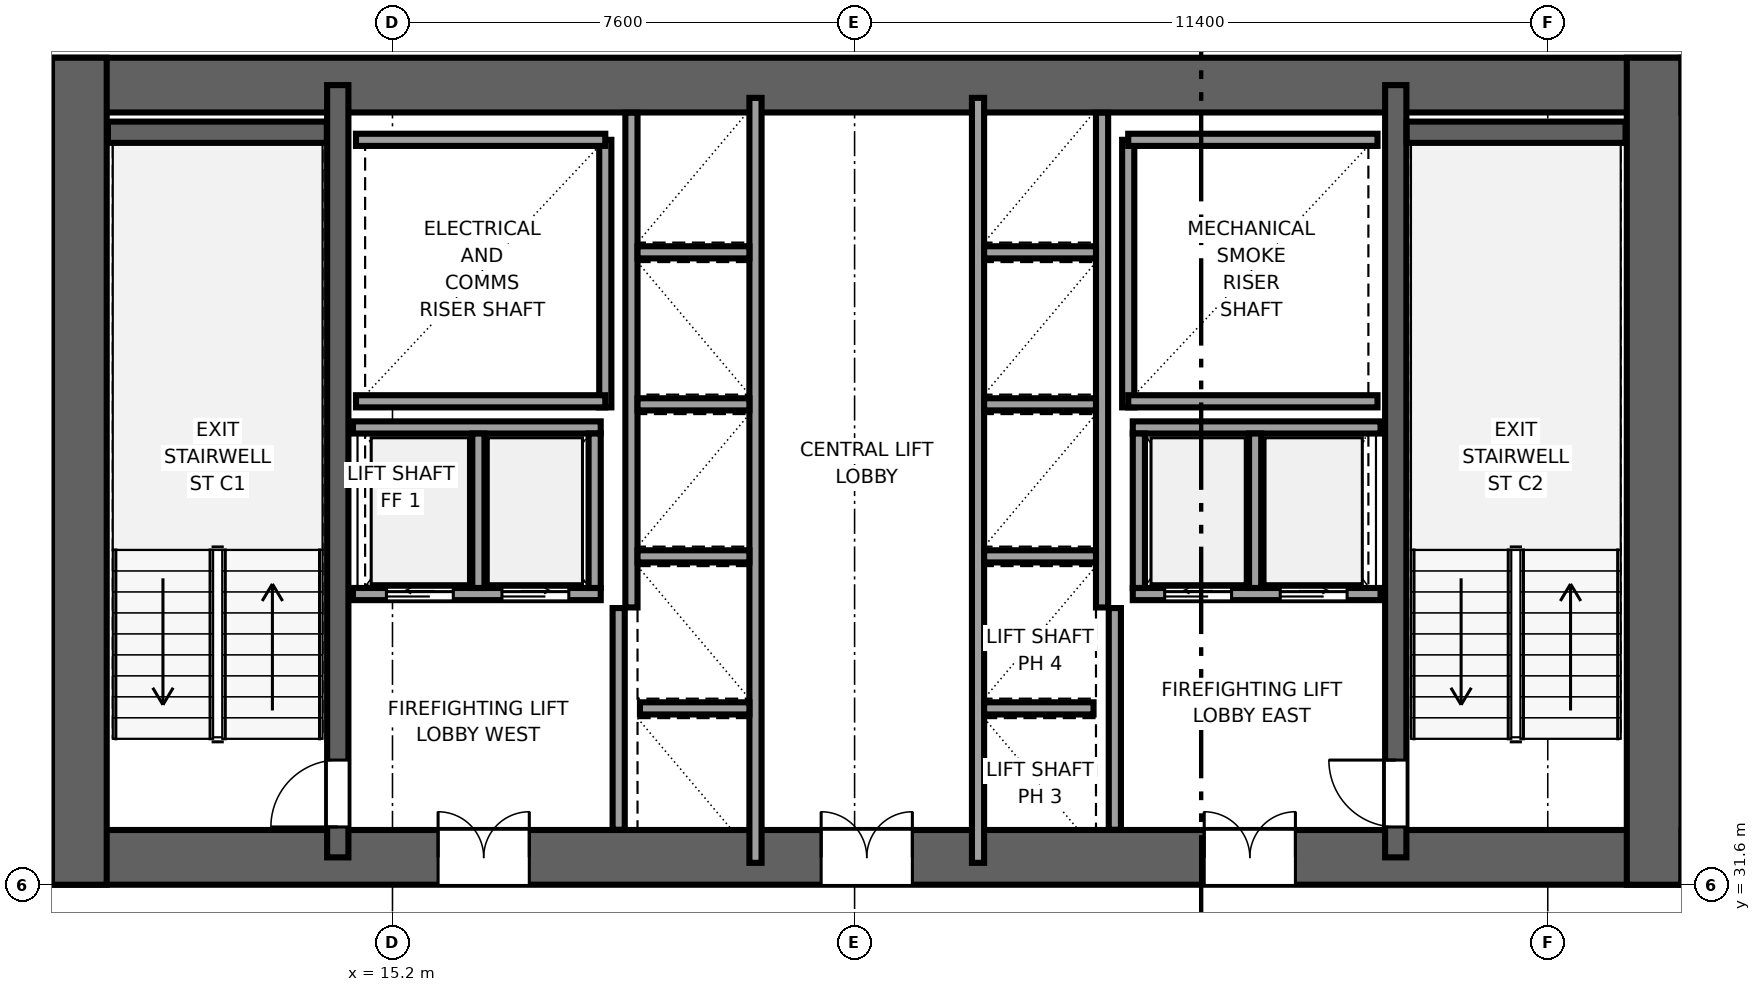
"""IFC4 building model, lengths in metres.
Left out: names, types, materials, properties, quantities, classifications, styles, units other than length and angle.
Written with IfcOpenShell. Run it as: python <this file> out.ifc"""

import sys

from ifc_helpers import new_model, si_unit, direction, frame, frame_2d, origin, place, context, subcontext, project, spatial, rectangle, extrude, source, transform, mapped, element, fill, save


model = new_model("IFC4")
c1 = context("Model", 3, precision=1e-05, world=origin(), true_north=direction((0.0, 1.0)))
c2 = subcontext(c1, "Body", "Model", "MODEL_VIEW")
j1 = project(units=[si_unit("LENGTHUNIT", "METRE"), si_unit("PLANEANGLEUNIT", "RADIAN")], contexts=[c1])
p1 = place(None, origin())
s1 = spatial("IfcSite", under=j1, at=p1, CompositionType="ELEMENT")
p2 = place(p1, origin())
s2 = spatial("IfcBuilding", under=s1, at=p2, CompositionType="ELEMENT")
p3 = place(p2, frame((0.0, 0.0, 32.0)))
s3 = spatial("IfcBuildingStorey", under=s2, at=p3, CompositionType="ELEMENT", Elevation=32.0)
p4 = place(p3, frame((9.6, 32.05, 0.0), z_axis=(0.0, 0.0, 1.0), x_axis=(1.0, 0.0, 0.0)))
e1 = element("IfcWall", 1, at=p4, inside=s3, PredefinedType="SHEAR", context=c2, shape_type="SweptSolid", body=[
    extrude(rectangle(XDim=26.8, YDim=0.9, at=frame_2d((13.4, 0.0))), origin(), (0.0, 0.0, 1.0), 3.55),
])
p5 = place(p4, frame((7.85, 0.0, 0.0), z_axis=(0.0, 0.0, 1.0), x_axis=(-1.0, 0.0, 0.0)))
e2 = element("IfcOpeningElement", 2, at=p5, cuts=e1, PredefinedType="OPENING", context=c2, shape_type="SweptSolid", body=[
    extrude(rectangle(XDim=1.5, YDim=2.04, at=frame_2d((0.75, 1.02))), frame((0.0, 0.46, 0.0), z_axis=(0.0, -1.0, 0.0), x_axis=(1.0, 0.0, 0.0)), (0.0, 0.0, 1.0), 0.92),
])
p6 = place(p4, frame((14.15, 0.0, 0.0), z_axis=(0.0, 0.0, 1.0), x_axis=(-1.0, 0.0, 0.0)))
e3 = element("IfcOpeningElement", 3, at=p6, cuts=e1, PredefinedType="OPENING", context=c2, shape_type="SweptSolid", body=[
    extrude(rectangle(XDim=1.5, YDim=2.04, at=frame_2d((0.75, 1.02))), frame((0.0, 0.46, 0.0), z_axis=(0.0, -1.0, 0.0), x_axis=(1.0, 0.0, 0.0)), (0.0, 0.0, 1.0), 0.92),
])
p7 = place(p4, frame((20.45, 0.0, 0.0), z_axis=(0.0, 0.0, 1.0), x_axis=(-1.0, 0.0, 0.0)))
e4 = element("IfcOpeningElement", 4, at=p7, cuts=e1, PredefinedType="OPENING", context=c2, shape_type="SweptSolid", body=[
    extrude(rectangle(XDim=1.5, YDim=2.04, at=frame_2d((0.75, 1.02))), frame((0.0, 0.46, 0.0), z_axis=(0.0, -1.0, 0.0), x_axis=(1.0, 0.0, 0.0)), (0.0, 0.0, 1.0), 0.92),
])
p8 = place(p3, frame((9.6, 44.75, 0.0), z_axis=(0.0, 0.0, 1.0), x_axis=(1.0, 0.0, 0.0)))
e5 = element("IfcWall", 5, at=p8, inside=s3, PredefinedType="SHEAR", context=c2, shape_type="SweptSolid", body=[
    extrude(rectangle(XDim=26.8, YDim=0.9, at=frame_2d((13.4, 0.0))), origin(), (0.0, 0.0, 1.0), 3.55),
])
for number, where, z_axis, x_axis in (
    (6, (10.05, 31.6, 0.0), (0.0, 0.0, 1.0), (0.0, 1.0, 0.0)),
    (7, (35.95, 31.6, 0.0), (0.0, 0.0, 1.0), (0.0, 1.0, 0.0)),
):
    element("IfcWall", number, at=place(p3, frame(where, z_axis=z_axis, x_axis=x_axis)), inside=s3, PredefinedType="SHEAR", context=c2, shape_type="SweptSolid", body=[
        extrude(rectangle(XDim=13.6, YDim=0.9, at=frame_2d((6.8, 0.0))), origin(), (0.0, 0.0, 1.0), 3.55),
    ])
p9 = place(p3, frame((14.3, 32.05, 0.0), z_axis=(0.0, 0.0, 1.0), x_axis=(0.0, 1.0, 0.0)))
e8 = element("IfcWall", 8, at=p9, inside=s3, PredefinedType="SHEAR", context=c2, shape_type="SweptSolid", body=[
    extrude(rectangle(XDim=12.7, YDim=0.35, at=frame_2d((6.35, 0.0))), origin(), (0.0, 0.0, 1.0), 3.55),
])
p10 = place(p9, frame((0.5, 0.0, 0.0)))
e9 = element("IfcOpeningElement", 9, at=p10, cuts=e8, PredefinedType="OPENING", context=c2, shape_type="SweptSolid", body=[
    extrude(rectangle(XDim=1.1, YDim=2.12, at=frame_2d((0.55, 1.06))), frame((0.0, 0.185, 0.0), z_axis=(0.0, -1.0, 0.0), x_axis=(1.0, 0.0, 0.0)), (0.0, 0.0, 1.0), 0.37),
])
p11 = place(p3, frame((31.7, 32.05, 0.0), z_axis=(0.0, 0.0, 1.0), x_axis=(0.0, 1.0, 0.0)))
e10 = element("IfcWall", 10, at=p11, inside=s3, PredefinedType="SHEAR", context=c2, shape_type="SweptSolid", body=[
    extrude(rectangle(XDim=12.7, YDim=0.35, at=frame_2d((6.35, 0.0))), origin(), (0.0, 0.0, 1.0), 3.55),
])
p12 = place(p11, frame((1.6, 0.0, 0.0), z_axis=(0.0, 0.0, 1.0), x_axis=(-1.0, 0.0, 0.0)))
e11 = element("IfcOpeningElement", 11, at=p12, cuts=e10, PredefinedType="OPENING", context=c2, shape_type="SweptSolid", body=[
    extrude(rectangle(XDim=1.1, YDim=2.12, at=frame_2d((0.55, 1.06))), frame((0.0, 0.185, 0.0), z_axis=(0.0, -1.0, 0.0), x_axis=(1.0, 0.0, 0.0)), (0.0, 0.0, 1.0), 0.37),
])
for number, where, z_axis, x_axis in (
    (12, (10.52, 43.975, 0.0), (0.0, 0.0, 1.0), (1.0, 0.0, 0.0)),
    (13, (31.88, 43.975, 0.0), (0.0, 0.0, 1.0), (1.0, 0.0, 0.0)),
):
    element("IfcWall", number, at=place(p3, frame(where, z_axis=z_axis, x_axis=x_axis)), inside=s3, PredefinedType="SHEAR", context=c2, shape_type="SweptSolid", body=[
        extrude(rectangle(XDim=3.6, YDim=0.35, at=frame_2d((1.8, 0.0))), origin(), (0.0, 0.0, 1.0), 3.55),
    ])
p13 = place(p3, frame((18.7, 39.45, 0.0), z_axis=(0.0, 0.0, 1.0), x_axis=(0.0, 1.0, 0.0)))
e14 = element("IfcWall", 14, at=p13, inside=s3, PredefinedType="SOLIDWALL", context=c2, shape_type="SweptSolid", body=[
    extrude(rectangle(XDim=4.4, YDim=0.2, at=frame_2d((2.2, 0.0))), origin(), (0.0, 0.0, 1.0), 3.37),
])
for number, where, z_axis, x_axis in (
    (15, (14.6, 39.55, 0.0), (0.0, 0.0, 1.0), (1.0, 0.0, 0.0)),
    (16, (14.6, 43.85, 0.0), (0.0, 0.0, 1.0), (1.0, 0.0, 0.0)),
):
    element("IfcWall", number, at=place(p3, frame(where, z_axis=z_axis, x_axis=x_axis)), inside=s3, PredefinedType="SOLIDWALL", context=c2, shape_type="SweptSolid", body=[
        extrude(rectangle(XDim=4.1, YDim=0.2, at=frame_2d((2.05, 0.0))), origin(), (0.0, 0.0, 1.0), 3.37),
    ])
p14 = place(p3, frame((27.3, 39.45, 0.0), z_axis=(0.0, 0.0, 1.0), x_axis=(0.0, 1.0, 0.0)))
e17 = element("IfcWall", 17, at=p14, inside=s3, PredefinedType="SOLIDWALL", context=c2, shape_type="SweptSolid", body=[
    extrude(rectangle(XDim=4.4, YDim=0.2, at=frame_2d((2.2, 0.0))), origin(), (0.0, 0.0, 1.0), 3.37),
])
for number, where, z_axis, x_axis in (
    (18, (27.3, 39.55, 0.0), (0.0, 0.0, 1.0), (1.0, 0.0, 0.0)),
    (19, (27.3, 43.85, 0.0), (0.0, 0.0, 1.0), (1.0, 0.0, 0.0)),
):
    element("IfcWall", number, at=place(p3, frame(where, z_axis=z_axis, x_axis=x_axis)), inside=s3, PredefinedType="SOLIDWALL", context=c2, shape_type="SweptSolid", body=[
        extrude(rectangle(XDim=4.1, YDim=0.2, at=frame_2d((2.05, 0.0))), origin(), (0.0, 0.0, 1.0), 3.37),
    ])
for number, where, z_axis, x_axis in (
    (20, (18.92, 32.504, 0.0), (0.0, 0.0, 1.0), (0.0, 1.0, 0.0)),
    (21, (27.08, 32.504, 0.0), (0.0, 0.0, 1.0), (0.0, 1.0, 0.0)),
):
    element("IfcWall", number, at=place(p3, frame(where, z_axis=z_axis, x_axis=x_axis)), inside=s3, PredefinedType="SOLIDWALL", context=c2, shape_type="SweptSolid", body=[
        extrude(rectangle(XDim=3.646, YDim=0.2, at=frame_2d((1.823, 0.0))), origin(), (0.0, 0.0, 1.0), 3.37),
    ])
p15 = place(p3, frame((21.17, 31.96, 0.0), z_axis=(0.0, 0.0, 1.0), x_axis=(0.0, 1.0, 0.0)))
e22 = element("IfcWall", 22, at=p15, inside=s3, PredefinedType="SOLIDWALL", context=c2, shape_type="SweptSolid", body=[
    extrude(rectangle(XDim=12.58, YDim=0.2, at=frame_2d((6.29, 0.0))), origin(), (0.0, 0.0, 1.0), 3.37),
])
p16 = place(p3, frame((19.13, 36.16, 0.0), z_axis=(0.0, 0.0, 1.0), x_axis=(0.0, 1.0, 0.0)))
e23 = element("IfcWall", 23, at=p16, inside=s3, PredefinedType="SOLIDWALL", context=c2, shape_type="SweptSolid", body=[
    extrude(rectangle(XDim=8.136, YDim=0.2, at=frame_2d((4.068, 0.0))), origin(), (0.0, 0.0, 1.0), 3.37),
])
p17 = place(p3, frame((19.27, 34.5, 0.0), z_axis=(0.0, 0.0, 1.0), x_axis=(1.0, 0.0, 0.0)))
e24 = element("IfcWall", 24, at=p17, inside=s3, PredefinedType="SOLIDWALL", context=c2, shape_type="SweptSolid", body=[
    extrude(rectangle(XDim=1.8, YDim=0.2, at=frame_2d((0.9, 0.0))), origin(), (0.0, 0.0, 1.0), 3.37),
])
for number, where, z_axis, x_axis in (
    (25, (19.23, 37.0, 0.0), (0.0, 0.0, 1.0), (1.0, 0.0, 0.0)),
    (26, (19.23, 39.5, 0.0), (0.0, 0.0, 1.0), (1.0, 0.0, 0.0)),
    (27, (19.23, 42.0, 0.0), (0.0, 0.0, 1.0), (1.0, 0.0, 0.0)),
):
    element("IfcWall", number, at=place(p3, frame(where, z_axis=z_axis, x_axis=x_axis)), inside=s3, PredefinedType="SOLIDWALL", context=c2, shape_type="SweptSolid", body=[
        extrude(rectangle(XDim=1.84, YDim=0.2, at=frame_2d((0.92, 0.0))), origin(), (0.0, 0.0, 1.0), 3.37),
    ])
p18 = place(p3, frame((27.375, 36.38, 0.0), z_axis=(0.0, 0.0, 1.0), x_axis=(1.0, 0.0, 0.0)))
e28 = element("IfcWall", 28, at=p18, inside=s3, PredefinedType="SOLIDWALL", context=c2, shape_type="SweptSolid", body=[
    extrude(rectangle(XDim=4.075, YDim=0.2, at=frame_2d((2.038, 0.0))), origin(), (0.0, 0.0, 1.0), 3.37),
])
p19 = place(p18, frame((0.525, 0.0, 0.0)))
e29 = element("IfcOpeningElement", 29, at=p19, cuts=e28, PredefinedType="OPENING", context=c2, shape_type="SweptSolid", body=[
    extrude(rectangle(XDim=1.1, YDim=2.12, at=frame_2d((0.55, 1.06))), frame((0.0, 0.11, 0.0), z_axis=(0.0, -1.0, 0.0), x_axis=(1.0, 0.0, 0.0)), (0.0, 0.0, 1.0), 0.22),
])
p20 = place(p18, frame((2.425, 0.0, 0.0)))
e30 = element("IfcOpeningElement", 30, at=p20, cuts=e28, PredefinedType="OPENING", context=c2, shape_type="SweptSolid", body=[
    extrude(rectangle(XDim=1.1, YDim=2.12, at=frame_2d((0.55, 1.06))), frame((0.0, 0.11, 0.0), z_axis=(0.0, -1.0, 0.0), x_axis=(1.0, 0.0, 0.0)), (0.0, 0.0, 1.0), 0.22),
])
p21 = place(p3, frame((27.375, 39.12, 0.0), z_axis=(0.0, 0.0, 1.0), x_axis=(1.0, 0.0, 0.0)))
e31 = element("IfcWall", 31, at=p21, inside=s3, PredefinedType="SOLIDWALL", context=c2, shape_type="SweptSolid", body=[
    extrude(rectangle(XDim=4.075, YDim=0.2, at=frame_2d((2.038, 0.0))), origin(), (0.0, 0.0, 1.0), 3.37),
])
for number, where, z_axis, x_axis in (
    (32, (27.475, 36.48, 0.0), (0.0, 0.0, 1.0), (0.0, 1.0, 0.0)),
    (33, (29.387, 36.48, 0.0), (0.0, 0.0, 1.0), (0.0, 1.0, 0.0)),
):
    element("IfcWall", number, at=place(p3, frame(where, z_axis=z_axis, x_axis=x_axis)), inside=s3, PredefinedType="SOLIDWALL", context=c2, shape_type="SweptSolid", body=[
        extrude(rectangle(XDim=2.54, YDim=0.2, at=frame_2d((1.27, 0.0))), origin(), (0.0, 0.0, 1.0), 3.37),
    ])
p22 = place(p3, frame((14.55, 36.38, 0.0), z_axis=(0.0, 0.0, 1.0), x_axis=(1.0, 0.0, 0.0)))
e34 = element("IfcWall", 34, at=p22, inside=s3, PredefinedType="SOLIDWALL", context=c2, shape_type="SweptSolid", body=[
    extrude(rectangle(XDim=4.075, YDim=0.2, at=frame_2d((2.038, 0.0))), origin(), (0.0, 0.0, 1.0), 3.37),
])
p23 = place(p22, frame((0.55, 0.0, 0.0)))
e35 = element("IfcOpeningElement", 35, at=p23, cuts=e34, PredefinedType="OPENING", context=c2, shape_type="SweptSolid", body=[
    extrude(rectangle(XDim=1.1, YDim=2.12, at=frame_2d((0.55, 1.06))), frame((0.0, 0.11, 0.0), z_axis=(0.0, -1.0, 0.0), x_axis=(1.0, 0.0, 0.0)), (0.0, 0.0, 1.0), 0.22),
])
p24 = place(p22, frame((2.45, 0.0, 0.0)))
e36 = element("IfcOpeningElement", 36, at=p24, cuts=e34, PredefinedType="OPENING", context=c2, shape_type="SweptSolid", body=[
    extrude(rectangle(XDim=1.1, YDim=2.12, at=frame_2d((0.55, 1.06))), frame((0.0, 0.11, 0.0), z_axis=(0.0, -1.0, 0.0), x_axis=(1.0, 0.0, 0.0)), (0.0, 0.0, 1.0), 0.22),
])
p25 = place(p3, frame((14.55, 39.12, 0.0), z_axis=(0.0, 0.0, 1.0), x_axis=(1.0, 0.0, 0.0)))
e37 = element("IfcWall", 37, at=p25, inside=s3, PredefinedType="SOLIDWALL", context=c2, shape_type="SweptSolid", body=[
    extrude(rectangle(XDim=4.075, YDim=0.2, at=frame_2d((2.038, 0.0))), origin(), (0.0, 0.0, 1.0), 3.37),
])
for number, where, z_axis, x_axis in (
    (38, (18.525, 36.48, 0.0), (0.0, 0.0, 1.0), (0.0, 1.0, 0.0)),
    (39, (16.613, 36.48, 0.0), (0.0, 0.0, 1.0), (0.0, 1.0, 0.0)),
):
    element("IfcWall", number, at=place(p3, frame(where, z_axis=z_axis, x_axis=x_axis)), inside=s3, PredefinedType="SOLIDWALL", context=c2, shape_type="SweptSolid", body=[
        extrude(rectangle(XDim=2.54, YDim=0.2, at=frame_2d((1.27, 0.0))), origin(), (0.0, 0.0, 1.0), 3.37),
    ])
p26 = place(p3, frame((24.83, 31.96, 0.0), z_axis=(0.0, 0.0, 1.0), x_axis=(0.0, 1.0, 0.0)))
e40 = element("IfcWall", 40, at=p26, inside=s3, PredefinedType="SOLIDWALL", context=c2, shape_type="SweptSolid", body=[
    extrude(rectangle(XDim=12.58, YDim=0.2, at=frame_2d((6.29, 0.0))), origin(), (0.0, 0.0, 1.0), 3.37),
])
p27 = place(p3, frame((26.87, 36.16, 0.0), z_axis=(0.0, 0.0, 1.0), x_axis=(0.0, 1.0, 0.0)))
e41 = element("IfcWall", 41, at=p27, inside=s3, PredefinedType="SOLIDWALL", context=c2, shape_type="SweptSolid", body=[
    extrude(rectangle(XDim=8.136, YDim=0.2, at=frame_2d((4.068, 0.0))), origin(), (0.0, 0.0, 1.0), 3.37),
])
p28 = place(p3, frame((24.93, 34.5, 0.0), z_axis=(0.0, 0.0, 1.0), x_axis=(1.0, 0.0, 0.0)))
e42 = element("IfcWall", 42, at=p28, inside=s3, PredefinedType="SOLIDWALL", context=c2, shape_type="SweptSolid", body=[
    extrude(rectangle(XDim=1.8, YDim=0.2, at=frame_2d((0.9, 0.0))), origin(), (0.0, 0.0, 1.0), 3.37),
])
for number, where, z_axis, x_axis in (
    (43, (24.93, 37.0, 0.0), (0.0, 0.0, 1.0), (1.0, 0.0, 0.0)),
    (44, (24.93, 39.5, 0.0), (0.0, 0.0, 1.0), (1.0, 0.0, 0.0)),
    (45, (24.93, 42.0, 0.0), (0.0, 0.0, 1.0), (1.0, 0.0, 0.0)),
):
    element("IfcWall", number, at=place(p3, frame(where, z_axis=z_axis, x_axis=x_axis)), inside=s3, PredefinedType="SOLIDWALL", context=c2, shape_type="SweptSolid", body=[
        extrude(rectangle(XDim=1.84, YDim=0.2, at=frame_2d((0.92, 0.0))), origin(), (0.0, 0.0, 1.0), 3.37),
    ])
m1 = source(origin(), c2, "Body", "SweptSolid", [
    extrude(rectangle(XDim=1.1, YDim=2.12, at=frame_2d((0.55, 1.06))), frame((0.0, 0.025, 0.0), z_axis=(0.0, -1.0, 0.0), x_axis=(1.0, 0.0, 0.0)), (0.0, 0.0, 1.0), 0.05),
])
p29 = place(p10, origin())
e46 = element("IfcDoor", 46, at=p29, inside=s3, OperationType="SINGLE_SWING_LEFT", PredefinedType="DOOR", context=c2, shape_type="MappedRepresentation", body=[
    mapped(m1, transform((0.0, 0.0, 0.0), x_axis=(1.0, 0.0, 0.0), y_axis=(0.0, 1.0, 0.0), z_axis=(0.0, 0.0, 1.0), scale=1.0)),
])
fill(e9, e46)
p30 = place(p12, origin())
e47 = element("IfcDoor", 47, at=p30, inside=s3, OperationType="SINGLE_SWING_RIGHT", PredefinedType="DOOR", context=c2, shape_type="MappedRepresentation", body=[
    mapped(m1, transform((0.0, 0.0, 0.0), x_axis=(1.0, 0.0, 0.0), y_axis=(0.0, 1.0, 0.0), z_axis=(0.0, 0.0, 1.0), scale=1.0)),
])
fill(e11, e47)
m2 = source(origin(), c2, "Body", "SweptSolid", [
    extrude(rectangle(XDim=1.5, YDim=2.04, at=frame_2d((0.75, 1.02))), frame((0.0, 0.025, 0.0), z_axis=(0.0, -1.0, 0.0), x_axis=(1.0, 0.0, 0.0)), (0.0, 0.0, 1.0), 0.05),
])
p31 = place(p5, origin())
e48 = element("IfcDoor", 48, at=p31, inside=s3, OperationType="DOUBLE_DOOR_SINGLE_SWING", PredefinedType="DOOR", context=c2, shape_type="MappedRepresentation", body=[
    mapped(m2, transform((0.0, 0.0, 0.0), x_axis=(1.0, 0.0, 0.0), y_axis=(0.0, 1.0, 0.0), z_axis=(0.0, 0.0, 1.0), scale=1.0)),
])
fill(e2, e48)
p32 = place(p6, origin())
e49 = element("IfcDoor", 49, at=p32, inside=s3, OperationType="DOUBLE_DOOR_SINGLE_SWING", PredefinedType="DOOR", context=c2, shape_type="MappedRepresentation", body=[
    mapped(m2, transform((0.0, 0.0, 0.0), x_axis=(1.0, 0.0, 0.0), y_axis=(0.0, 1.0, 0.0), z_axis=(0.0, 0.0, 1.0), scale=1.0)),
])
fill(e3, e49)
p33 = place(p7, origin())
e50 = element("IfcDoor", 50, at=p33, inside=s3, OperationType="DOUBLE_DOOR_SINGLE_SWING", PredefinedType="DOOR", context=c2, shape_type="MappedRepresentation", body=[
    mapped(m2, transform((0.0, 0.0, 0.0), x_axis=(1.0, 0.0, 0.0), y_axis=(0.0, 1.0, 0.0), z_axis=(0.0, 0.0, 1.0), scale=1.0)),
])
fill(e4, e50)
m3 = source(origin(), c2, "Body", "SweptSolid", [
    extrude(rectangle(XDim=1.1, YDim=2.12, at=frame_2d((0.55, 1.06))), frame((0.0, 0.025, 0.0), z_axis=(0.0, -1.0, 0.0), x_axis=(1.0, 0.0, 0.0)), (0.0, 0.0, 1.0), 0.05),
])
p34 = place(p19, origin())
e51 = element("IfcDoor", 51, at=p34, inside=s3, OperationType="SLIDING_TO_LEFT", PredefinedType="DOOR", context=c2, shape_type="MappedRepresentation", body=[
    mapped(m3, transform((0.0, 0.0, 0.0), x_axis=(1.0, 0.0, 0.0), y_axis=(0.0, 1.0, 0.0), z_axis=(0.0, 0.0, 1.0), scale=1.0)),
])
fill(e29, e51)
p35 = place(p20, origin())
e52 = element("IfcDoor", 52, at=p35, inside=s3, OperationType="SLIDING_TO_RIGHT", PredefinedType="DOOR", context=c2, shape_type="MappedRepresentation", body=[
    mapped(m3, transform((0.0, 0.0, 0.0), x_axis=(1.0, 0.0, 0.0), y_axis=(0.0, 1.0, 0.0), z_axis=(0.0, 0.0, 1.0), scale=1.0)),
])
fill(e30, e52)
p36 = place(p23, origin())
e53 = element("IfcDoor", 53, at=p36, inside=s3, OperationType="SLIDING_TO_LEFT", PredefinedType="DOOR", context=c2, shape_type="MappedRepresentation", body=[
    mapped(m3, transform((0.0, 0.0, 0.0), x_axis=(1.0, 0.0, 0.0), y_axis=(0.0, 1.0, 0.0), z_axis=(0.0, 0.0, 1.0), scale=1.0)),
])
fill(e35, e53)
p37 = place(p24, origin())
e54 = element("IfcDoor", 54, at=p37, inside=s3, OperationType="SLIDING_TO_RIGHT", PredefinedType="DOOR", context=c2, shape_type="MappedRepresentation", body=[
    mapped(m3, transform((0.0, 0.0, 0.0), x_axis=(1.0, 0.0, 0.0), y_axis=(0.0, 1.0, 0.0), z_axis=(0.0, 0.0, 1.0), scale=1.0)),
])
fill(e36, e54)
save(model, sys.argv[1])
